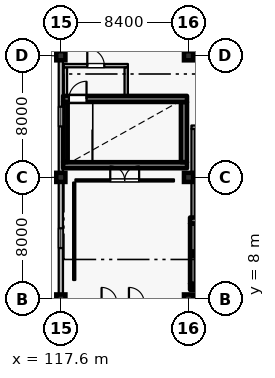
"""IFC4 building model, lengths in metres.
Left out: names, types, materials, properties, quantities, classifications, styles, units other than length and angle.
Written with IfcOpenShell. Run it as: python <this file> out.ifc"""

import sys

from ifc_helpers import new_model, si_unit, direction, frame, frame_2d, origin, origin_2d, place, context, subcontext, project, spatial, rectangle, hollow_rectangle, extrude, element, fill, save


model = new_model("IFC4")
c1 = context("Model", 3, precision=1e-05, world=origin(), true_north=direction((0.0, 1.0)))
c2 = subcontext(c1, "Body", "Model", "MODEL_VIEW")
j1 = project(units=[si_unit("LENGTHUNIT", "METRE"), si_unit("PLANEANGLEUNIT", "RADIAN")], contexts=[c1])
p1 = place(None, origin())
s1 = spatial("IfcSite", under=j1, at=p1, CompositionType="ELEMENT")
p2 = place(p1, origin())
s2 = spatial("IfcBuilding", under=s1, at=p2, CompositionType="ELEMENT")
p3 = place(p2, frame((0.0, 0.0, 39.6)))
s3 = spatial("IfcBuildingStorey", under=s2, at=p3, CompositionType="ELEMENT", Elevation=39.6)
for number, where, z_axis, x_axis in (
    (1, (117.6, 16.0, 0.0), (0.0, 0.0, 1.0), (1.0, 0.0, 0.0)),
    (2, (126.0, 16.0, 0.0), (0.0, 0.0, 1.0), (1.0, 0.0, 0.0)),
    (3, (117.6, 8.0, 0.0), (0.0, 0.0, 1.0), (1.0, 0.0, 0.0)),
    (4, (117.6, 24.0, 0.0), (0.0, 0.0, 1.0), (1.0, 0.0, 0.0)),
    (5, (126.0, 8.0, 0.0), (0.0, 0.0, 1.0), (1.0, 0.0, 0.0)),
    (6, (126.0, 24.0, 0.0), (0.0, 0.0, 1.0), (1.0, 0.0, 0.0)),
):
    element("IfcColumn", number, at=place(p3, frame(where, z_axis=z_axis, x_axis=x_axis)), inside=s3, PredefinedType="COLUMN", context=c2, shape_type="SweptSolid", body=[
        extrude(rectangle(XDim=0.6, YDim=0.6, at=origin_2d()), origin(), (0.0, 0.0, 1.0), 3.6),
    ])
p4 = place(p3, frame((117.6, 8.3, 0.0), z_axis=(0.0, 0.0, 1.0), x_axis=(0.0, 1.0, 0.0)))
e7 = element("IfcWall", 7, at=p4, inside=s3, PredefinedType="SOLIDWALL", context=c2, shape_type="SweptSolid", body=[
    extrude(rectangle(XDim=7.4, YDim=0.28, at=frame_2d((3.7, 0.0))), origin(), (0.0, 0.0, 1.0), 2.7),
])
p5 = place(p4, frame((3.05, 0.0, 0.5)))
e8 = element("IfcOpeningElement", 8, at=p5, cuts=e7, PredefinedType="OPENING", context=c2, shape_type="SweptSolid", body=[
    extrude(rectangle(XDim=1.3, YDim=1.65, at=frame_2d((0.65, 0.825))), frame((0.0, 0.15, 0.0), z_axis=(0.0, -1.0, 0.0), x_axis=(1.0, 0.0, 0.0)), (0.0, 0.0, 1.0), 0.3),
])
p6 = place(p3, frame((117.6, 16.3, 0.0), z_axis=(0.0, 0.0, 1.0), x_axis=(0.0, 1.0, 0.0)))
e9 = element("IfcWall", 9, at=p6, inside=s3, PredefinedType="SOLIDWALL", context=c2, shape_type="SweptSolid", body=[
    extrude(rectangle(XDim=7.4, YDim=0.28, at=frame_2d((3.7, 0.0))), origin(), (0.0, 0.0, 1.0), 2.7),
])
p7 = place(p6, frame((3.05, 0.0, 0.5)))
e10 = element("IfcOpeningElement", 10, at=p7, cuts=e9, PredefinedType="OPENING", context=c2, shape_type="SweptSolid", body=[
    extrude(rectangle(XDim=1.3, YDim=1.65, at=frame_2d((0.65, 0.825))), frame((0.0, 0.15, 0.0), z_axis=(0.0, -1.0, 0.0), x_axis=(1.0, 0.0, 0.0)), (0.0, 0.0, 1.0), 0.3),
])
p8 = place(p3, frame((126.1, 8.8, 0.0), z_axis=(0.0, 0.0, 1.0), x_axis=(1.0, 0.0, 0.0)))
e11 = element("IfcWall", 11, at=p8, inside=s3, PredefinedType="SHEAR", context=c2, shape_type="SweptSolid", body=[
    extrude(rectangle(XDim=8.2, YDim=0.4, at=frame_2d((4.1, 0.0))), origin(), (0.0, 0.0, 1.0), 3.335),
])
p9 = place(p3, frame((126.1, 13.16, 0.0), z_axis=(0.0, 0.0, 1.0), x_axis=(1.0, 0.0, 0.0)))
e12 = element("IfcWall", 12, at=p9, inside=s3, PredefinedType="SHEAR", context=c2, shape_type="SweptSolid", body=[
    extrude(rectangle(XDim=8.2, YDim=0.4, at=frame_2d((4.1, 0.0))), origin(), (0.0, 0.0, 1.0), 3.335),
])
p10 = place(p9, frame((0.43, 0.0, 0.0)))
e13 = element("IfcOpeningElement", 13, at=p10, cuts=e12, PredefinedType="OPENING", context=c2, shape_type="SweptSolid", body=[
    extrude(rectangle(XDim=1.16, YDim=2.2, at=frame_2d((0.58, 1.1))), frame((0.0, 0.21, 0.0), z_axis=(0.0, -1.0, 0.0), x_axis=(1.0, 0.0, 0.0)), (0.0, 0.0, 1.0), 0.42),
])
p11 = place(p3, frame((126.3, 9.005, 0.0), z_axis=(0.0, 0.0, 1.0), x_axis=(0.0, 1.0, 0.0)))
e14 = element("IfcWall", 14, at=p11, inside=s3, PredefinedType="SHEAR", context=c2, shape_type="SweptSolid", body=[
    extrude(rectangle(XDim=3.95, YDim=0.4, at=frame_2d((1.975, 0.0))), origin(), (0.0, 0.0, 1.0), 3.335),
])
p12 = place(p3, frame((126.3, 13.365, 0.0), z_axis=(0.0, 0.0, 1.0), x_axis=(0.0, 1.0, 0.0)))
e15 = element("IfcWall", 15, at=p12, inside=s3, PredefinedType="PARTITIONING", context=c2, shape_type="SweptSolid", body=[
    extrude(rectangle(XDim=5.82, YDim=0.22, at=frame_2d((2.91, 0.0))), origin(), (0.0, 0.0, 1.0), 3.335),
])
p13 = place(p3, frame((126.19, 19.3, 0.0), z_axis=(0.0, 0.0, 1.0), x_axis=(1.0, 0.0, 0.0)))
e16 = element("IfcWall", 16, at=p13, inside=s3, PredefinedType="PARTITIONING", context=c2, shape_type="SweptSolid", body=[
    extrude(rectangle(XDim=3.82, YDim=0.22, at=frame_2d((1.91, 0.0))), origin(), (0.0, 0.0, 1.0), 3.335),
])
p14 = place(p13, frame((1.35, 0.0, 0.0)))
e17 = element("IfcOpeningElement", 17, at=p14, cuts=e16, PredefinedType="OPENING", context=c2, shape_type="SweptSolid", body=[
    extrude(rectangle(XDim=1.12, YDim=2.2, at=frame_2d((0.56, 1.1))), frame((0.0, 0.12, 0.0), z_axis=(0.0, -1.0, 0.0), x_axis=(1.0, 0.0, 0.0)), (0.0, 0.0, 1.0), 0.24),
])
for number, where, z_axis, x_axis in (
    (18, (126.48, 8.8, 0.0), (0.0, 0.0, 1.0), (1.0, 0.0, 0.0)),
    (19, (126.48, 10.98, 0.0), (0.0, 0.0, 1.0), (1.0, 0.0, 0.0)),
):
    element("IfcColumn", number, at=place(p3, frame(where, z_axis=z_axis, x_axis=x_axis)), inside=s3, PredefinedType="COLUMN", context=c2, shape_type="SweptSolid", body=[
        extrude(hollow_rectangle(XDim=0.3, YDim=0.3, WallThickness=0.012, at=origin_2d()), origin(), (0.0, 0.0, 1.0), 3.42),
    ])
p15 = place(p3, frame((117.75, 16.8, 0.0), z_axis=(0.0, 0.0, 1.0), x_axis=(1.0, 0.0, 0.0)))
e20 = element("IfcWall", 20, at=p15, inside=s3, PredefinedType="SHEAR", context=c2, shape_type="SweptSolid", body=[
    extrude(rectangle(XDim=8.15, YDim=0.4, at=frame_2d((4.075, 0.0))), origin(), (0.0, 0.0, 1.0), 3.335),
])
p16 = place(p3, frame((125.7, 17.005, 0.0), z_axis=(0.0, 0.0, 1.0), x_axis=(0.0, 1.0, 0.0)))
e21 = element("IfcWall", 21, at=p16, inside=s3, PredefinedType="SHEAR", context=c2, shape_type="SweptSolid", body=[
    extrude(rectangle(XDim=3.95, YDim=0.4, at=frame_2d((1.975, 0.0))), origin(), (0.0, 0.0, 1.0), 3.335),
])
p17 = place(p3, frame((117.75, 21.16, 0.0), z_axis=(0.0, 0.0, 1.0), x_axis=(1.0, 0.0, 0.0)))
e22 = element("IfcWall", 22, at=p17, inside=s3, PredefinedType="SHEAR", context=c2, shape_type="SweptSolid", body=[
    extrude(rectangle(XDim=8.15, YDim=0.4, at=frame_2d((4.075, 0.0))), origin(), (0.0, 0.0, 1.0), 3.335),
])
p18 = place(p17, frame((0.38, 0.0, 0.0)))
e23 = element("IfcOpeningElement", 23, at=p18, cuts=e22, PredefinedType="OPENING", context=c2, shape_type="SweptSolid", body=[
    extrude(rectangle(XDim=1.16, YDim=2.2, at=frame_2d((0.58, 1.1))), frame((0.0, 0.21, 0.0), z_axis=(0.0, -1.0, 0.0), x_axis=(1.0, 0.0, 0.0)), (0.0, 0.0, 1.0), 0.42),
])
p19 = place(p3, frame((117.9, 17.005, 0.0), z_axis=(0.0, 0.0, 1.0), x_axis=(0.0, 1.0, 0.0)))
e24 = element("IfcWall", 24, at=p19, inside=s3, PredefinedType="SHEAR", context=c2, shape_type="SweptSolid", body=[
    extrude(rectangle(XDim=3.95, YDim=0.3, at=frame_2d((1.975, 0.0))), origin(), (0.0, 0.0, 1.0), 3.335),
])
p20 = place(p3, frame((117.9, 21.365, 0.0), z_axis=(0.0, 0.0, 1.0), x_axis=(0.0, 1.0, 0.0)))
e25 = element("IfcWall", 25, at=p20, inside=s3, PredefinedType="PARTITIONING", context=c2, shape_type="SweptSolid", body=[
    extrude(rectangle(XDim=1.87, YDim=0.22, at=frame_2d((0.935, 0.0))), origin(), (0.0, 0.0, 1.0), 3.335),
])
p21 = place(p3, frame((117.79, 23.35, 0.0), z_axis=(0.0, 0.0, 1.0), x_axis=(1.0, 0.0, 0.0)))
e26 = element("IfcWall", 26, at=p21, inside=s3, PredefinedType="PARTITIONING", context=c2, shape_type="SweptSolid", body=[
    extrude(rectangle(XDim=4.22, YDim=0.22, at=frame_2d((2.11, 0.0))), origin(), (0.0, 0.0, 1.0), 3.335),
])
p22 = place(p21, frame((1.55, 0.0, 0.0)))
e27 = element("IfcOpeningElement", 27, at=p22, cuts=e26, PredefinedType="OPENING", context=c2, shape_type="SweptSolid", body=[
    extrude(rectangle(XDim=1.12, YDim=2.2, at=frame_2d((0.56, 1.1))), frame((0.0, 0.12, 0.0), z_axis=(0.0, -1.0, 0.0), x_axis=(1.0, 0.0, 0.0)), (0.0, 0.0, 1.0), 0.24),
])
p23 = place(p3, frame((121.9, 21.365, 0.0), z_axis=(0.0, 0.0, 1.0), x_axis=(0.0, 1.0, 0.0)))
e28 = element("IfcWall", 28, at=p23, inside=s3, PredefinedType="PARTITIONING", context=c2, shape_type="SweptSolid", body=[
    extrude(rectangle(XDim=1.87, YDim=0.22, at=frame_2d((0.935, 0.0))), origin(), (0.0, 0.0, 1.0), 3.335),
])
p24 = place(p3, frame((118.56, 15.8, 0.0), z_axis=(0.0, 0.0, 1.0), x_axis=(1.0, 0.0, 0.0)))
e29 = element("IfcWall", 29, at=p24, inside=s3, PredefinedType="PARTITIONING", context=c2, shape_type="SweptSolid", body=[
    extrude(rectangle(XDim=6.48, YDim=0.14, at=frame_2d((3.24, 0.0))), origin(), (0.0, 0.0, 1.0), 3.335),
])
p25 = place(p24, frame((2.29, 0.0, 0.0)))
e30 = element("IfcOpeningElement", 30, at=p25, cuts=e29, PredefinedType="OPENING", context=c2, shape_type="SweptSolid", body=[
    extrude(rectangle(XDim=1.9, YDim=2.4, at=frame_2d((0.95, 1.2))), frame((0.0, 0.08, 0.0), z_axis=(0.0, -1.0, 0.0), x_axis=(1.0, 0.0, 0.0)), (0.0, 0.0, 1.0), 0.16),
])
p26 = place(p3, frame((118.48, 9.25, 0.0), z_axis=(0.0, 0.0, 1.0), x_axis=(0.0, 1.0, 0.0)))
e31 = element("IfcWall", 31, at=p26, inside=s3, PredefinedType="PARTITIONING", context=c2, shape_type="SweptSolid", body=[
    extrude(rectangle(XDim=6.41, YDim=0.14, at=frame_2d((3.205, 0.0))), origin(), (0.0, 0.0, 1.0), 3.335),
])
p27 = place(p5, origin())
e32 = element("IfcWindow", 32, at=p27, inside=s3, PartitioningType="SINGLE_PANEL", PredefinedType="WINDOW", context=c2, shape_type="SweptSolid", body=[
    extrude(rectangle(XDim=1.3, YDim=1.65, at=frame_2d((0.65, 0.825))), frame((0.0, 0.03, 0.0), z_axis=(0.0, -1.0, 0.0), x_axis=(1.0, 0.0, 0.0)), (0.0, 0.0, 1.0), 0.06),
])
fill(e8, e32)
p28 = place(p7, origin())
e33 = element("IfcWindow", 33, at=p28, inside=s3, PartitioningType="SINGLE_PANEL", PredefinedType="WINDOW", context=c2, shape_type="SweptSolid", body=[
    extrude(rectangle(XDim=1.3, YDim=1.65, at=frame_2d((0.65, 0.825))), frame((0.0, 0.03, 0.0), z_axis=(0.0, -1.0, 0.0), x_axis=(1.0, 0.0, 0.0)), (0.0, 0.0, 1.0), 0.06),
])
fill(e10, e33)
p29 = place(p18, origin())
e34 = element("IfcDoor", 34, at=p29, inside=s3, OperationType="SINGLE_SWING_RIGHT", PredefinedType="DOOR", context=c2, shape_type="SweptSolid", body=[
    extrude(rectangle(XDim=1.16, YDim=2.2, at=frame_2d((0.58, 1.1))), frame((0.0, 0.025, 0.0), z_axis=(0.0, -1.0, 0.0), x_axis=(1.0, 0.0, 0.0)), (0.0, 0.0, 1.0), 0.05),
])
fill(e23, e34)
p30 = place(p22, origin())
e35 = element("IfcDoor", 35, at=p30, inside=s3, OperationType="SINGLE_SWING_LEFT", PredefinedType="DOOR", context=c2, shape_type="SweptSolid", body=[
    extrude(rectangle(XDim=1.12, YDim=2.2, at=frame_2d((0.56, 1.1))), frame((0.0, 0.025, 0.0), z_axis=(0.0, -1.0, 0.0), x_axis=(1.0, 0.0, 0.0)), (0.0, 0.0, 1.0), 0.05),
])
fill(e27, e35)
p31 = place(p25, origin())
e36 = element("IfcDoor", 36, at=p31, inside=s3, OperationType="DOUBLE_DOOR_SINGLE_SWING", PredefinedType="DOOR", context=c2, shape_type="SweptSolid", body=[
    extrude(rectangle(XDim=1.9, YDim=2.4, at=frame_2d((0.95, 1.2))), frame((0.0, 0.025, 0.0), z_axis=(0.0, -1.0, 0.0), x_axis=(1.0, 0.0, 0.0)), (0.0, 0.0, 1.0), 0.05),
])
fill(e30, e36)
save(model, sys.argv[1])
